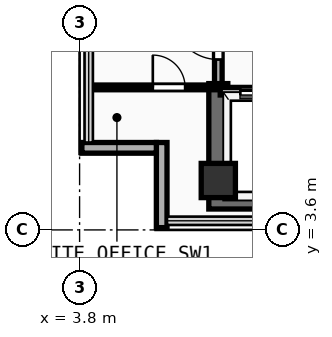
"""IFC4 building model, lengths in metres.
Left out: names, types, materials, properties, quantities, classifications, styles, units other than length and angle.
Written with IfcOpenShell. Run it as: python <this file> out.ifc"""

import sys

from ifc_helpers import new_model, si_unit, direction, frame, frame_2d, origin, origin_2d, place, context, subcontext, project, spatial, rectangle, extrude, element, fill, save


model = new_model("IFC4")
c1 = context("Model", 3, precision=1e-05, world=origin(), true_north=direction((0.0, 1.0)))
c2 = subcontext(c1, "Body", "Model", "MODEL_VIEW")
j1 = project(units=[si_unit("LENGTHUNIT", "METRE"), si_unit("PLANEANGLEUNIT", "RADIAN")], contexts=[c1])
p1 = place(None, origin())
s1 = spatial("IfcSite", under=j1, at=p1, CompositionType="ELEMENT")
p2 = place(p1, origin())
s2 = spatial("IfcBuilding", under=s1, at=p2, CompositionType="ELEMENT")
p3 = place(p2, frame((0.0, 0.0, 285.6)))
s3 = spatial("IfcBuildingStorey", under=s2, at=p3, CompositionType="ELEMENT", Elevation=285.6)
p4 = place(p3, frame((7.2, 4.4, 0.0), z_axis=(0.0, 0.0, 1.0), x_axis=(1.0, 0.0, 0.0)))
e1 = element("IfcWall", 1, at=p4, inside=s3, PredefinedType="SHEAR", context=c2, shape_type="SweptSolid", body=[
    extrude(rectangle(XDim=13.85, YDim=0.5, at=frame_2d((6.925, 0.0))), origin(), (0.0, 0.0, 1.0), 3.56),
])
p5 = place(p3, frame((7.45, 4.65, 0.0), z_axis=(0.0, 0.0, 1.0), x_axis=(0.0, 1.0, 0.0)))
e2 = element("IfcWall", 2, at=p5, inside=s3, PredefinedType="SHEAR", context=c2, shape_type="SweptSolid", body=[
    extrude(rectangle(XDim=2.8, YDim=0.5, at=frame_2d((1.4, 0.0))), origin(), (0.0, 0.0, 1.0), 3.56),
])
p6 = place(p3, frame((7.45, 4.9, 0.0), z_axis=(0.0, 0.0, 1.0), x_axis=(1.0, 0.0, 0.0)))
e3 = element("IfcColumn", 3, at=p6, inside=s3, PredefinedType="COLUMN", context=c2, shape_type="SweptSolid", body=[
    extrude(rectangle(XDim=0.9, YDim=0.9, at=origin_2d()), origin(), (0.0, 0.0, 1.0), 3.56),
])
p7 = place(p3, frame((5.96, 3.66, 0.0), z_axis=(0.0, 0.0, 1.0), x_axis=(0.0, 1.0, 0.0)))
e4 = element("IfcWall", 4, at=p7, inside=s3, PredefinedType="SOLIDWALL", context=c2, shape_type="SweptSolid", body=[
    extrude(rectangle(XDim=2.24, YDim=0.28, at=frame_2d((1.12, 0.0))), origin(), (0.0, 0.0, 1.0), 3.56),
])
p8 = place(p3, frame((3.86, 5.76, 0.0), z_axis=(0.0, 0.0, 1.0), x_axis=(1.0, 0.0, 0.0)))
e5 = element("IfcWall", 5, at=p8, inside=s3, PredefinedType="SOLIDWALL", context=c2, shape_type="SweptSolid", body=[
    extrude(rectangle(XDim=1.96, YDim=0.28, at=frame_2d((0.98, 0.0))), origin(), (0.0, 0.0, 1.0), 3.56),
])
p9 = place(p3, frame((7.5, 7.25, 0.0), z_axis=(0.0, 0.0, 1.0), x_axis=(1.0, 0.0, 0.0)))
e6 = element("IfcWall", 6, at=p9, inside=s3, PredefinedType="PARTITIONING", context=c2, shape_type="SweptSolid", body=[
    extrude(rectangle(XDim=8.35, YDim=0.2, at=frame_2d((4.175, 0.0))), origin(), (0.0, 0.0, 1.0), 3.56),
])
p10 = place(p9, frame((0.53, 0.0, 0.0)))
e7 = element("IfcOpeningElement", 7, at=p10, cuts=e6, PredefinedType="OPENING", context=c2, shape_type="SweptSolid", body=[
    extrude(rectangle(XDim=1.1, YDim=2.2, at=frame_2d((0.55, 1.1))), frame((0.0, 0.11, 0.0), z_axis=(0.0, -1.0, 0.0), x_axis=(1.0, 0.0, 0.0)), (0.0, 0.0, 1.0), 0.22),
])
p11 = place(p9, frame((2.37, 0.0, 0.0)))
e8 = element("IfcOpeningElement", 8, at=p11, cuts=e6, PredefinedType="OPENING", context=c2, shape_type="SweptSolid", body=[
    extrude(rectangle(XDim=1.1, YDim=2.2, at=frame_2d((0.55, 1.1))), frame((0.0, 0.11, 0.0), z_axis=(0.0, -1.0, 0.0), x_axis=(1.0, 0.0, 0.0)), (0.0, 0.0, 1.0), 0.22),
])
p12 = place(p9, frame((4.33, 0.0, 0.0)))
e9 = element("IfcOpeningElement", 9, at=p12, cuts=e6, PredefinedType="OPENING", context=c2, shape_type="SweptSolid", body=[
    extrude(rectangle(XDim=1.1, YDim=2.2, at=frame_2d((0.55, 1.1))), frame((0.0, 0.11, 0.0), z_axis=(0.0, -1.0, 0.0), x_axis=(1.0, 0.0, 0.0)), (0.0, 0.0, 1.0), 0.22),
])
p13 = place(p9, frame((6.5, 0.0, 0.0)))
e10 = element("IfcOpeningElement", 10, at=p13, cuts=e6, PredefinedType="OPENING", context=c2, shape_type="SweptSolid", body=[
    extrude(rectangle(XDim=1.1, YDim=2.2, at=frame_2d((0.55, 1.1))), frame((0.0, 0.11, 0.0), z_axis=(0.0, -1.0, 0.0), x_axis=(1.0, 0.0, 0.0)), (0.0, 0.0, 1.0), 0.22),
])
p14 = place(p3, frame((7.45, 7.45, 0.0), z_axis=(0.0, 0.0, 1.0), x_axis=(0.0, 1.0, 0.0)))
e11 = element("IfcWall", 11, at=p14, inside=s3, PredefinedType="PARTITIONING", context=c2, shape_type="SweptSolid", body=[
    extrude(rectangle(XDim=2.3, YDim=0.2, at=frame_2d((1.15, 0.0))), origin(), (0.0, 0.0, 1.0), 2.54),
])
p15 = place(p14, frame((0.633, 0.0, 0.0)))
e12 = element("IfcOpeningElement", 12, at=p15, cuts=e11, PredefinedType="OPENING", context=c2, shape_type="SweptSolid", body=[
    extrude(rectangle(XDim=1.2, YDim=2.25, at=frame_2d((0.6, 1.125))), frame((0.0, 0.11, 0.0), z_axis=(0.0, -1.0, 0.0), x_axis=(1.0, 0.0, 0.0)), (0.0, 0.0, 1.0), 0.22),
])
p16 = place(p3, frame((4.04, 7.35, 0.0), z_axis=(0.0, 0.0, 1.0), x_axis=(1.0, 0.0, 0.0)))
e13 = element("IfcWall", 13, at=p16, inside=s3, PredefinedType="PARTITIONING", context=c2, shape_type="SweptSolid", body=[
    extrude(rectangle(XDim=3.36, YDim=0.125, at=frame_2d((1.68, 0.0))), origin(), (0.0, 0.0, 1.0), 3.56),
])
p17 = place(p16, frame((1.687, 0.0, 0.0)))
e14 = element("IfcOpeningElement", 14, at=p17, cuts=e13, PredefinedType="OPENING", context=c2, shape_type="SweptSolid", body=[
    extrude(rectangle(XDim=0.85, YDim=2.15, at=frame_2d((0.425, 1.075))), frame((0.0, 0.073, 0.0), z_axis=(0.0, -1.0, 0.0), x_axis=(1.0, 0.0, 0.0)), (0.0, 0.0, 1.0), 0.145),
])
p18 = place(p10, origin())
e15 = element("IfcDoor", 15, at=p18, inside=s3, OperationType="SLIDING_TO_LEFT", PredefinedType="DOOR", context=c2, shape_type="SweptSolid", body=[
    extrude(rectangle(XDim=1.1, YDim=2.2, at=frame_2d((0.55, 1.1))), frame((0.0, 0.025, 0.0), z_axis=(0.0, -1.0, 0.0), x_axis=(1.0, 0.0, 0.0)), (0.0, 0.0, 1.0), 0.05),
])
fill(e7, e15)
p19 = place(p15, frame((1.2, 0.0, 0.0), z_axis=(0.0, 0.0, 1.0), x_axis=(-1.0, 0.0, 0.0)))
e16 = element("IfcDoor", 16, at=p19, inside=s3, OperationType="SINGLE_SWING_LEFT", PredefinedType="DOOR", context=c2, shape_type="SweptSolid", body=[
    extrude(rectangle(XDim=1.2, YDim=2.25, at=frame_2d((0.6, 1.125))), frame((0.0, 0.025, 0.0), z_axis=(0.0, -1.0, 0.0), x_axis=(1.0, 0.0, 0.0)), (0.0, 0.0, 1.0), 0.05),
])
fill(e12, e16)
p20 = place(p17, origin())
e17 = element("IfcDoor", 17, at=p20, inside=s3, OperationType="SINGLE_SWING_LEFT", PredefinedType="DOOR", context=c2, shape_type="SweptSolid", body=[
    extrude(rectangle(XDim=0.85, YDim=2.15, at=frame_2d((0.425, 1.075))), frame((0.0, 0.025, 0.0), z_axis=(0.0, -1.0, 0.0), x_axis=(1.0, 0.0, 0.0)), (0.0, 0.0, 1.0), 0.05),
])
fill(e14, e17)
save(model, sys.argv[1])
